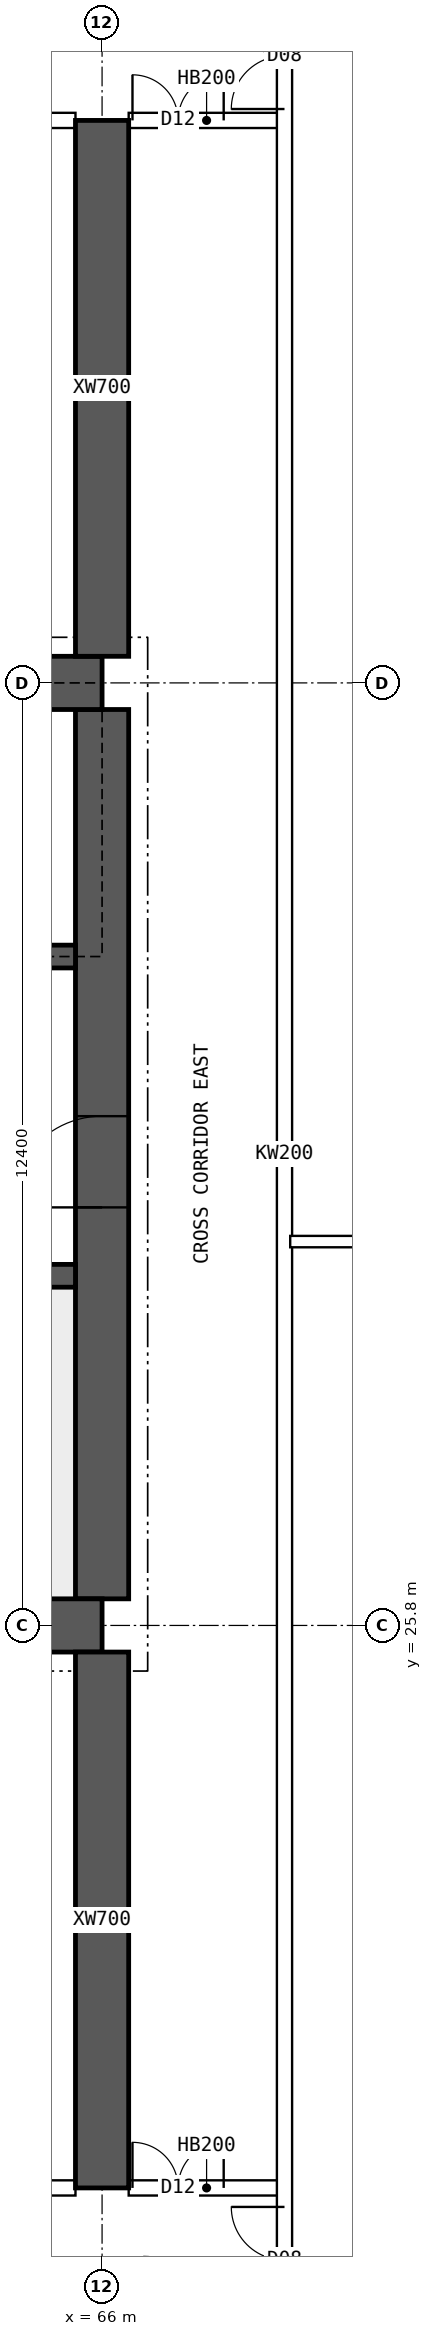
"""IFC4 building model, lengths in metres.
Left out: names, types, materials, properties, quantities, classifications, styles, units other than length and angle.
Written with IfcOpenShell. Run it as: python <this file> out.ifc"""

import sys

from ifc_helpers import new_model, si_unit, direction, frame, frame_2d, origin, place, context, subcontext, project, spatial, polyline, rectangle, outline, extrude, element, fill, save


model = new_model("IFC4")
c1 = context("Model", 3, precision=1e-05, world=origin(), true_north=direction((0.0, 1.0)))
c2 = subcontext(c1, "Body", "Model", "MODEL_VIEW")
j1 = project(units=[si_unit("LENGTHUNIT", "METRE"), si_unit("PLANEANGLEUNIT", "RADIAN")], contexts=[c1])
p1 = place(None, origin())
s1 = spatial("IfcSite", under=j1, at=p1, CompositionType="ELEMENT")
p2 = place(p1, origin())
s2 = spatial("IfcBuilding", under=s1, at=p2, CompositionType="ELEMENT")
p3 = place(p2, frame((0.0, 0.0, 257.8)))
s3 = spatial("IfcBuildingStorey", under=s2, at=p3, CompositionType="ELEMENT", Elevation=257.8)
for number, where, z_axis, x_axis in (
    (1, (18.0, 25.8, 0.0), (0.0, 0.0, 1.0), (1.0, 0.0, 0.0)),
    (2, (18.0, 38.2, 0.0), (0.0, 0.0, 1.0), (1.0, 0.0, 0.0)),
):
    element("IfcWall", number, at=place(p3, frame(where, z_axis=z_axis, x_axis=x_axis)), inside=s3, PredefinedType="SHEAR", context=c2, shape_type="SweptSolid", body=[
        extrude(rectangle(XDim=48.0, YDim=0.7, at=frame_2d((24.0, 0.0))), origin(), (0.0, 0.0, 1.0), 4.5),
    ])
p4 = place(p3, frame((66.0, 26.15, 0.0), z_axis=(0.0, 0.0, 1.0), x_axis=(0.0, 1.0, 0.0)))
e3 = element("IfcWall", 3, at=p4, inside=s3, PredefinedType="SHEAR", context=c2, shape_type="SweptSolid", body=[
    extrude(rectangle(XDim=11.7, YDim=0.7, at=frame_2d((5.85, 0.0))), origin(), (0.0, 0.0, 1.0), 4.5),
])
p5 = place(p4, frame((5.15, 0.0, 0.0)))
e4 = element("IfcOpeningElement", 4, at=p5, cuts=e3, PredefinedType="OPENING", context=c2, shape_type="SweptSolid", body=[
    extrude(rectangle(XDim=1.2, YDim=2.1, at=frame_2d((0.6, 1.05))), frame((0.0, 0.36, 0.0), z_axis=(0.0, -1.0, 0.0), x_axis=(1.0, 0.0, 0.0)), (0.0, 0.0, 1.0), 0.72),
])
p6 = place(p3, frame((18.35, 30.4, 0.0), z_axis=(0.0, 0.0, 1.0), x_axis=(1.0, 0.0, 0.0)))
e5 = element("IfcWall", 5, at=p6, inside=s3, PredefinedType="SHEAR", context=c2, shape_type="SweptSolid", body=[
    extrude(rectangle(XDim=47.3, YDim=0.3, at=frame_2d((23.65, 0.0))), origin(), (0.0, 0.0, 1.0), 4.5),
])
p7 = place(p6, frame((0.4, 0.0, 0.0)))
e6 = element("IfcOpeningElement", 6, at=p7, cuts=e5, PredefinedType="OPENING", context=c2, shape_type="SweptSolid", body=[
    extrude(rectangle(XDim=1.0, YDim=2.1, at=frame_2d((0.5, 1.05))), frame((0.0, 0.16, 0.0), z_axis=(0.0, -1.0, 0.0), x_axis=(1.0, 0.0, 0.0)), (0.0, 0.0, 1.0), 0.32),
])
p8 = place(p6, frame((45.9, 0.0, 0.0)))
e7 = element("IfcOpeningElement", 7, at=p8, cuts=e5, PredefinedType="OPENING", context=c2, shape_type="SweptSolid", body=[
    extrude(rectangle(XDim=1.0, YDim=2.1, at=frame_2d((0.5, 1.05))), frame((0.0, 0.16, 0.0), z_axis=(0.0, -1.0, 0.0), x_axis=(1.0, 0.0, 0.0)), (0.0, 0.0, 1.0), 0.32),
])
p9 = place(p6, frame((8.4, 0.0, 0.0)))
e8 = element("IfcOpeningElement", 8, at=p9, cuts=e5, PredefinedType="OPENING", context=c2, shape_type="SweptSolid", body=[
    extrude(rectangle(XDim=1.1, YDim=2.1, at=frame_2d((0.55, 1.05))), frame((0.0, 0.16, 0.0), z_axis=(0.0, -1.0, 0.0), x_axis=(1.0, 0.0, 0.0)), (0.0, 0.0, 1.0), 0.32),
])
p10 = place(p6, frame((11.0, 0.0, 0.0)))
e9 = element("IfcOpeningElement", 9, at=p10, cuts=e5, PredefinedType="OPENING", context=c2, shape_type="SweptSolid", body=[
    extrude(rectangle(XDim=1.1, YDim=2.1, at=frame_2d((0.55, 1.05))), frame((0.0, 0.16, 0.0), z_axis=(0.0, -1.0, 0.0), x_axis=(1.0, 0.0, 0.0)), (0.0, 0.0, 1.0), 0.32),
])
p11 = place(p6, frame((13.6, 0.0, 0.0)))
e10 = element("IfcOpeningElement", 10, at=p11, cuts=e5, PredefinedType="OPENING", context=c2, shape_type="SweptSolid", body=[
    extrude(rectangle(XDim=1.1, YDim=2.1, at=frame_2d((0.55, 1.05))), frame((0.0, 0.16, 0.0), z_axis=(0.0, -1.0, 0.0), x_axis=(1.0, 0.0, 0.0)), (0.0, 0.0, 1.0), 0.32),
])
p12 = place(p6, frame((16.2, 0.0, 0.0)))
e11 = element("IfcOpeningElement", 11, at=p12, cuts=e5, PredefinedType="OPENING", context=c2, shape_type="SweptSolid", body=[
    extrude(rectangle(XDim=1.1, YDim=2.1, at=frame_2d((0.55, 1.05))), frame((0.0, 0.16, 0.0), z_axis=(0.0, -1.0, 0.0), x_axis=(1.0, 0.0, 0.0)), (0.0, 0.0, 1.0), 0.32),
])
p13 = place(p6, frame((18.975, 0.0, 0.0)))
e12 = element("IfcOpeningElement", 12, at=p13, cuts=e5, PredefinedType="OPENING", context=c2, shape_type="SweptSolid", body=[
    extrude(rectangle(XDim=0.9, YDim=2.1, at=frame_2d((0.45, 1.05))), frame((0.0, 0.16, 0.0), z_axis=(0.0, -1.0, 0.0), x_axis=(1.0, 0.0, 0.0)), (0.0, 0.0, 1.0), 0.32),
])
p14 = place(p6, frame((24.475, 0.0, 0.0)))
e13 = element("IfcOpeningElement", 13, at=p14, cuts=e5, PredefinedType="OPENING", context=c2, shape_type="SweptSolid", body=[
    extrude(rectangle(XDim=0.9, YDim=2.1, at=frame_2d((0.45, 1.05))), frame((0.0, 0.16, 0.0), z_axis=(0.0, -1.0, 0.0), x_axis=(1.0, 0.0, 0.0)), (0.0, 0.0, 1.0), 0.32),
])
p15 = place(p6, frame((30.267, 0.0, 0.0)))
e14 = element("IfcOpeningElement", 14, at=p15, cuts=e5, PredefinedType="OPENING", context=c2, shape_type="SweptSolid", body=[
    extrude(rectangle(XDim=1.1, YDim=2.1, at=frame_2d((0.55, 1.05))), frame((0.0, 0.16, 0.0), z_axis=(0.0, -1.0, 0.0), x_axis=(1.0, 0.0, 0.0)), (0.0, 0.0, 1.0), 0.32),
])
p16 = place(p6, frame((33.8, 0.0, 0.0)))
e15 = element("IfcOpeningElement", 15, at=p16, cuts=e5, PredefinedType="OPENING", context=c2, shape_type="SweptSolid", body=[
    extrude(rectangle(XDim=1.1, YDim=2.1, at=frame_2d((0.55, 1.05))), frame((0.0, 0.16, 0.0), z_axis=(0.0, -1.0, 0.0), x_axis=(1.0, 0.0, 0.0)), (0.0, 0.0, 1.0), 0.32),
])
p17 = place(p6, frame((37.333, 0.0, 0.0)))
e16 = element("IfcOpeningElement", 16, at=p17, cuts=e5, PredefinedType="OPENING", context=c2, shape_type="SweptSolid", body=[
    extrude(rectangle(XDim=1.1, YDim=2.1, at=frame_2d((0.55, 1.05))), frame((0.0, 0.16, 0.0), z_axis=(0.0, -1.0, 0.0), x_axis=(1.0, 0.0, 0.0)), (0.0, 0.0, 1.0), 0.32),
])
p18 = place(p3, frame((18.35, 34.6, 0.0), z_axis=(0.0, 0.0, 1.0), x_axis=(1.0, 0.0, 0.0)))
e17 = element("IfcWall", 17, at=p18, inside=s3, PredefinedType="SHEAR", context=c2, shape_type="SweptSolid", body=[
    extrude(rectangle(XDim=47.3, YDim=0.3, at=frame_2d((23.65, 0.0))), origin(), (0.0, 0.0, 1.0), 4.5),
])
p19 = place(p18, frame((0.9, 0.0, 0.0)))
e18 = element("IfcOpeningElement", 18, at=p19, cuts=e17, PredefinedType="OPENING", context=c2, shape_type="SweptSolid", body=[
    extrude(rectangle(XDim=1.1, YDim=2.1, at=frame_2d((0.55, 1.05))), frame((0.0, 0.16, 0.0), z_axis=(0.0, -1.0, 0.0), x_axis=(1.0, 0.0, 0.0)), (0.0, 0.0, 1.0), 0.32),
])
p20 = place(p18, frame((45.3, 0.0, 0.0)))
e19 = element("IfcOpeningElement", 19, at=p20, cuts=e17, PredefinedType="OPENING", context=c2, shape_type="SweptSolid", body=[
    extrude(rectangle(XDim=1.1, YDim=2.1, at=frame_2d((0.55, 1.05))), frame((0.0, 0.16, 0.0), z_axis=(0.0, -1.0, 0.0), x_axis=(1.0, 0.0, 0.0)), (0.0, 0.0, 1.0), 0.32),
])
p21 = place(p18, frame((4.25, 0.0, 0.0)))
e20 = element("IfcOpeningElement", 20, at=p21, cuts=e17, PredefinedType="OPENING", context=c2, shape_type="SweptSolid", body=[
    extrude(rectangle(XDim=0.9, YDim=2.1, at=frame_2d((0.45, 1.05))), frame((0.0, 0.16, 0.0), z_axis=(0.0, -1.0, 0.0), x_axis=(1.0, 0.0, 0.0)), (0.0, 0.0, 1.0), 0.32),
])
p22 = place(p18, frame((42.15, 0.0, 0.0)))
e21 = element("IfcOpeningElement", 21, at=p22, cuts=e17, PredefinedType="OPENING", context=c2, shape_type="SweptSolid", body=[
    extrude(rectangle(XDim=0.9, YDim=2.1, at=frame_2d((0.45, 1.05))), frame((0.0, 0.16, 0.0), z_axis=(0.0, -1.0, 0.0), x_axis=(1.0, 0.0, 0.0)), (0.0, 0.0, 1.0), 0.32),
])
p23 = place(p18, frame((9.025, 0.0, 0.0)))
e22 = element("IfcOpeningElement", 22, at=p23, cuts=e17, PredefinedType="OPENING", context=c2, shape_type="SweptSolid", body=[
    extrude(rectangle(XDim=0.9, YDim=2.1, at=frame_2d((0.45, 1.05))), frame((0.0, 0.16, 0.0), z_axis=(0.0, -1.0, 0.0), x_axis=(1.0, 0.0, 0.0)), (0.0, 0.0, 1.0), 0.32),
])
p24 = place(p18, frame((12.999, 0.0, 0.0)))
e23 = element("IfcOpeningElement", 23, at=p24, cuts=e17, PredefinedType="OPENING", context=c2, shape_type="SweptSolid", body=[
    extrude(rectangle(XDim=0.9, YDim=2.1, at=frame_2d((0.45, 1.05))), frame((0.0, 0.16, 0.0), z_axis=(0.0, -1.0, 0.0), x_axis=(1.0, 0.0, 0.0)), (0.0, 0.0, 1.0), 0.32),
])
p25 = place(p18, frame((16.646, 0.0, 0.0)))
e24 = element("IfcOpeningElement", 24, at=p25, cuts=e17, PredefinedType="OPENING", context=c2, shape_type="SweptSolid", body=[
    extrude(rectangle(XDim=0.9, YDim=2.1, at=frame_2d((0.45, 1.05))), frame((0.0, 0.16, 0.0), z_axis=(0.0, -1.0, 0.0), x_axis=(1.0, 0.0, 0.0)), (0.0, 0.0, 1.0), 0.32),
])
p26 = place(p18, frame((20.405, 0.0, 0.0)))
e25 = element("IfcOpeningElement", 25, at=p26, cuts=e17, PredefinedType="OPENING", context=c2, shape_type="SweptSolid", body=[
    extrude(rectangle(XDim=0.9, YDim=2.1, at=frame_2d((0.45, 1.05))), frame((0.0, 0.16, 0.0), z_axis=(0.0, -1.0, 0.0), x_axis=(1.0, 0.0, 0.0)), (0.0, 0.0, 1.0), 0.32),
])
p27 = place(p18, frame((24.811, 0.0, 0.0)))
e26 = element("IfcOpeningElement", 26, at=p27, cuts=e17, PredefinedType="OPENING", context=c2, shape_type="SweptSolid", body=[
    extrude(rectangle(XDim=0.9, YDim=2.1, at=frame_2d((0.45, 1.05))), frame((0.0, 0.16, 0.0), z_axis=(0.0, -1.0, 0.0), x_axis=(1.0, 0.0, 0.0)), (0.0, 0.0, 1.0), 0.32),
])
p28 = place(p18, frame((27.608, 0.0, 0.0)))
e27 = element("IfcOpeningElement", 27, at=p28, cuts=e17, PredefinedType="OPENING", context=c2, shape_type="SweptSolid", body=[
    extrude(rectangle(XDim=0.9, YDim=2.1, at=frame_2d((0.45, 1.05))), frame((0.0, 0.16, 0.0), z_axis=(0.0, -1.0, 0.0), x_axis=(1.0, 0.0, 0.0)), (0.0, 0.0, 1.0), 0.32),
])
p29 = place(p18, frame((29.981, 0.0, 0.0)))
e28 = element("IfcOpeningElement", 28, at=p29, cuts=e17, PredefinedType="OPENING", context=c2, shape_type="SweptSolid", body=[
    extrude(rectangle(XDim=0.9, YDim=2.1, at=frame_2d((0.45, 1.05))), frame((0.0, 0.16, 0.0), z_axis=(0.0, -1.0, 0.0), x_axis=(1.0, 0.0, 0.0)), (0.0, 0.0, 1.0), 0.32),
])
p30 = place(p18, frame((33.831, 0.0, 0.0)))
e29 = element("IfcOpeningElement", 29, at=p30, cuts=e17, PredefinedType="OPENING", context=c2, shape_type="SweptSolid", body=[
    extrude(rectangle(XDim=0.9, YDim=2.1, at=frame_2d((0.45, 1.05))), frame((0.0, 0.16, 0.0), z_axis=(0.0, -1.0, 0.0), x_axis=(1.0, 0.0, 0.0)), (0.0, 0.0, 1.0), 0.32),
])
p31 = place(p18, frame((37.579, 0.0, 0.0)))
e30 = element("IfcOpeningElement", 30, at=p31, cuts=e17, PredefinedType="OPENING", context=c2, shape_type="SweptSolid", body=[
    extrude(rectangle(XDim=0.9, YDim=2.1, at=frame_2d((0.45, 1.05))), frame((0.0, 0.16, 0.0), z_axis=(0.0, -1.0, 0.0), x_axis=(1.0, 0.0, 0.0)), (0.0, 0.0, 1.0), 0.32),
])
for number, where, z_axis, x_axis in (
    (31, (66.0, 18.4, 0.0), (0.0, 0.0, 1.0), (0.0, 1.0, 0.0)),
    (32, (66.0, 38.55, 0.0), (0.0, 0.0, 1.0), (0.0, 1.0, 0.0)),
):
    element("IfcWall", number, at=place(p3, frame(where, z_axis=z_axis, x_axis=x_axis)), inside=s3, PredefinedType="SHEAR", context=c2, shape_type="SweptSolid", body=[
        extrude(rectangle(XDim=7.05, YDim=0.7, at=frame_2d((3.525, 0.0))), origin(), (0.0, 0.0, 1.0), 4.5),
    ])
p32 = place(p3, frame((60.35, 18.4, 0.0), z_axis=(0.0, 0.0, 1.0), x_axis=(1.0, 0.0, 0.0)))
e33 = element("IfcWall", 33, at=p32, inside=s3, PredefinedType="SOLIDWALL", context=c2, shape_type="SweptSolid", body=[
    extrude(rectangle(XDim=5.3, YDim=0.2, at=frame_2d((2.65, 0.0))), origin(), (0.0, 0.0, 1.0), 4.2),
])
p33 = place(p32, frame((0.15, 0.0, 0.0)))
e34 = element("IfcOpeningElement", 34, at=p33, cuts=e33, PredefinedType="OPENING", context=c2, shape_type="SweptSolid", body=[
    extrude(rectangle(XDim=0.9, YDim=2.1, at=frame_2d((0.45, 1.05))), frame((0.0, 0.11, 0.0), z_axis=(0.0, -1.0, 0.0), x_axis=(1.0, 0.0, 0.0)), (0.0, 0.0, 1.0), 0.22),
])
p34 = place(p32, frame((3.705, 0.0, 0.0)))
e35 = element("IfcOpeningElement", 35, at=p34, cuts=e33, PredefinedType="OPENING", context=c2, shape_type="SweptSolid", body=[
    extrude(rectangle(XDim=0.9, YDim=2.1, at=frame_2d((0.45, 1.05))), frame((0.0, 0.11, 0.0), z_axis=(0.0, -1.0, 0.0), x_axis=(1.0, 0.0, 0.0)), (0.0, 0.0, 1.0), 0.22),
])
p35 = place(p3, frame((66.35, 18.4, 0.0), z_axis=(0.0, 0.0, 1.0), x_axis=(1.0, 0.0, 0.0)))
e36 = element("IfcWall", 36, at=p35, inside=s3, PredefinedType="SOLIDWALL", context=c2, shape_type="SweptSolid", body=[
    extrude(rectangle(XDim=2.05, YDim=0.2, at=frame_2d((1.025, 0.0))), origin(), (0.0, 0.0, 1.0), 4.2),
])
p36 = place(p35, frame((0.05, 0.0, 0.0)))
e37 = element("IfcOpeningElement", 37, at=p36, cuts=e36, PredefinedType="OPENING", context=c2, shape_type="SweptSolid", body=[
    extrude(rectangle(XDim=1.2, YDim=2.1, at=frame_2d((0.6, 1.05))), frame((0.0, 0.11, 0.0), z_axis=(0.0, -1.0, 0.0), x_axis=(1.0, 0.0, 0.0)), (0.0, 0.0, 1.0), 0.22),
])
p37 = place(p3, frame((60.35, 45.6, 0.0), z_axis=(0.0, 0.0, 1.0), x_axis=(1.0, 0.0, 0.0)))
e38 = element("IfcWall", 38, at=p37, inside=s3, PredefinedType="SOLIDWALL", context=c2, shape_type="SweptSolid", body=[
    extrude(rectangle(XDim=5.3, YDim=0.2, at=frame_2d((2.65, 0.0))), origin(), (0.0, 0.0, 1.0), 4.2),
])
p38 = place(p37, frame((0.15, 0.0, 0.0)))
e39 = element("IfcOpeningElement", 39, at=p38, cuts=e38, PredefinedType="OPENING", context=c2, shape_type="SweptSolid", body=[
    extrude(rectangle(XDim=0.9, YDim=2.1, at=frame_2d((0.45, 1.05))), frame((0.0, 0.11, 0.0), z_axis=(0.0, -1.0, 0.0), x_axis=(1.0, 0.0, 0.0)), (0.0, 0.0, 1.0), 0.22),
])
p39 = place(p37, frame((3.665, 0.0, 0.0)))
e40 = element("IfcOpeningElement", 40, at=p39, cuts=e38, PredefinedType="OPENING", context=c2, shape_type="SweptSolid", body=[
    extrude(rectangle(XDim=0.9, YDim=2.1, at=frame_2d((0.45, 1.05))), frame((0.0, 0.11, 0.0), z_axis=(0.0, -1.0, 0.0), x_axis=(1.0, 0.0, 0.0)), (0.0, 0.0, 1.0), 0.22),
])
p40 = place(p3, frame((66.35, 45.6, 0.0), z_axis=(0.0, 0.0, 1.0), x_axis=(1.0, 0.0, 0.0)))
e41 = element("IfcWall", 41, at=p40, inside=s3, PredefinedType="SOLIDWALL", context=c2, shape_type="SweptSolid", body=[
    extrude(rectangle(XDim=2.05, YDim=0.2, at=frame_2d((1.025, 0.0))), origin(), (0.0, 0.0, 1.0), 4.2),
])
p41 = place(p40, frame((0.05, 0.0, 0.0)))
e42 = element("IfcOpeningElement", 42, at=p41, cuts=e41, PredefinedType="OPENING", context=c2, shape_type="SweptSolid", body=[
    extrude(rectangle(XDim=1.2, YDim=2.1, at=frame_2d((0.6, 1.05))), frame((0.0, 0.11, 0.0), z_axis=(0.0, -1.0, 0.0), x_axis=(1.0, 0.0, 0.0)), (0.0, 0.0, 1.0), 0.22),
])
p42 = place(p3, frame((68.475, 30.85, 0.0), z_axis=(0.0, 0.0, 1.0), x_axis=(1.0, 0.0, 0.0)))
e43 = element("IfcWall", 43, at=p42, inside=s3, PredefinedType="PARTITIONING", context=c2, shape_type="SweptSolid", body=[
    extrude(outline(polyline([(0.0, 0.0), (6.82, 0.0), (6.82, 4.2), (3.827, 4.2), (3.825, 3.75), (3.227, 3.75), (3.225, 4.2), (0.0, 4.2), (0.0, 0.0)])), frame((0.0, 0.075, 0.0), z_axis=(0.0, -1.0, 0.0), x_axis=(1.0, 0.0, 0.0)), (0.0, 0.0, 1.0), 0.15),
])
p43 = place(p3, frame((68.4, 11.646, 0.0), z_axis=(0.0, 0.0, 1.0), x_axis=(0.0, 1.0, 0.0)))
e44 = element("IfcWall", 44, at=p43, inside=s3, PredefinedType="SOLIDWALL", context=c2, shape_type="SweptSolid", body=[
    extrude(rectangle(XDim=40.708, YDim=0.2, at=frame_2d((20.354, 0.0))), origin(), (0.0, 0.0, 1.0), 4.2),
])
p44 = place(p43, frame((5.104, 0.0, 0.0)))
e45 = element("IfcOpeningElement", 45, at=p44, cuts=e44, PredefinedType="OPENING", context=c2, shape_type="SweptSolid", body=[
    extrude(rectangle(XDim=1.4, YDim=2.1, at=frame_2d((0.7, 1.05))), frame((0.0, 0.11, 0.0), z_axis=(0.0, -1.0, 0.0), x_axis=(1.0, 0.0, 0.0)), (0.0, 0.0, 1.0), 0.22),
])
p45 = place(p43, frame((34.104, 0.0, 0.0)))
e46 = element("IfcOpeningElement", 46, at=p45, cuts=e44, PredefinedType="OPENING", context=c2, shape_type="SweptSolid", body=[
    extrude(rectangle(XDim=1.4, YDim=2.1, at=frame_2d((0.7, 1.05))), frame((0.0, 0.11, 0.0), z_axis=(0.0, -1.0, 0.0), x_axis=(1.0, 0.0, 0.0)), (0.0, 0.0, 1.0), 0.22),
])
p46 = place(p5, origin())
e47 = element("IfcDoor", 47, at=p46, inside=s3, OperationType="SINGLE_SWING_LEFT", PredefinedType="DOOR", context=c2, shape_type="SweptSolid", body=[
    extrude(rectangle(XDim=1.2, YDim=2.1, at=frame_2d((0.6, 1.05))), frame((0.0, 0.025, 0.0), z_axis=(0.0, -1.0, 0.0), x_axis=(1.0, 0.0, 0.0)), (0.0, 0.0, 1.0), 0.05),
])
fill(e4, e47)
p47 = place(p36, origin())
e48 = element("IfcDoor", 48, at=p47, inside=s3, OperationType="DOUBLE_DOOR_SINGLE_SWING", PredefinedType="DOOR", context=c2, shape_type="SweptSolid", body=[
    extrude(rectangle(XDim=1.2, YDim=2.1, at=frame_2d((0.6, 1.05))), frame((0.0, 0.025, 0.0), z_axis=(0.0, -1.0, 0.0), x_axis=(1.0, 0.0, 0.0)), (0.0, 0.0, 1.0), 0.05),
])
fill(e37, e48)
p48 = place(p41, origin())
e49 = element("IfcDoor", 49, at=p48, inside=s3, OperationType="DOUBLE_DOOR_SINGLE_SWING", PredefinedType="DOOR", context=c2, shape_type="SweptSolid", body=[
    extrude(rectangle(XDim=1.2, YDim=2.1, at=frame_2d((0.6, 1.05))), frame((0.0, 0.025, 0.0), z_axis=(0.0, -1.0, 0.0), x_axis=(1.0, 0.0, 0.0)), (0.0, 0.0, 1.0), 0.05),
])
fill(e42, e49)
p49 = place(p44, origin())
e50 = element("IfcDoor", 50, at=p49, inside=s3, OperationType="DOUBLE_DOOR_SINGLE_SWING", PredefinedType="DOOR", context=c2, shape_type="SweptSolid", body=[
    extrude(rectangle(XDim=1.4, YDim=2.1, at=frame_2d((0.7, 1.05))), frame((0.0, 0.025, 0.0), z_axis=(0.0, -1.0, 0.0), x_axis=(1.0, 0.0, 0.0)), (0.0, 0.0, 1.0), 0.05),
])
fill(e45, e50)
p50 = place(p45, origin())
e51 = element("IfcDoor", 51, at=p50, inside=s3, OperationType="DOUBLE_DOOR_SINGLE_SWING", PredefinedType="DOOR", context=c2, shape_type="SweptSolid", body=[
    extrude(rectangle(XDim=1.4, YDim=2.1, at=frame_2d((0.7, 1.05))), frame((0.0, 0.025, 0.0), z_axis=(0.0, -1.0, 0.0), x_axis=(1.0, 0.0, 0.0)), (0.0, 0.0, 1.0), 0.05),
])
fill(e46, e51)
save(model, sys.argv[1])
